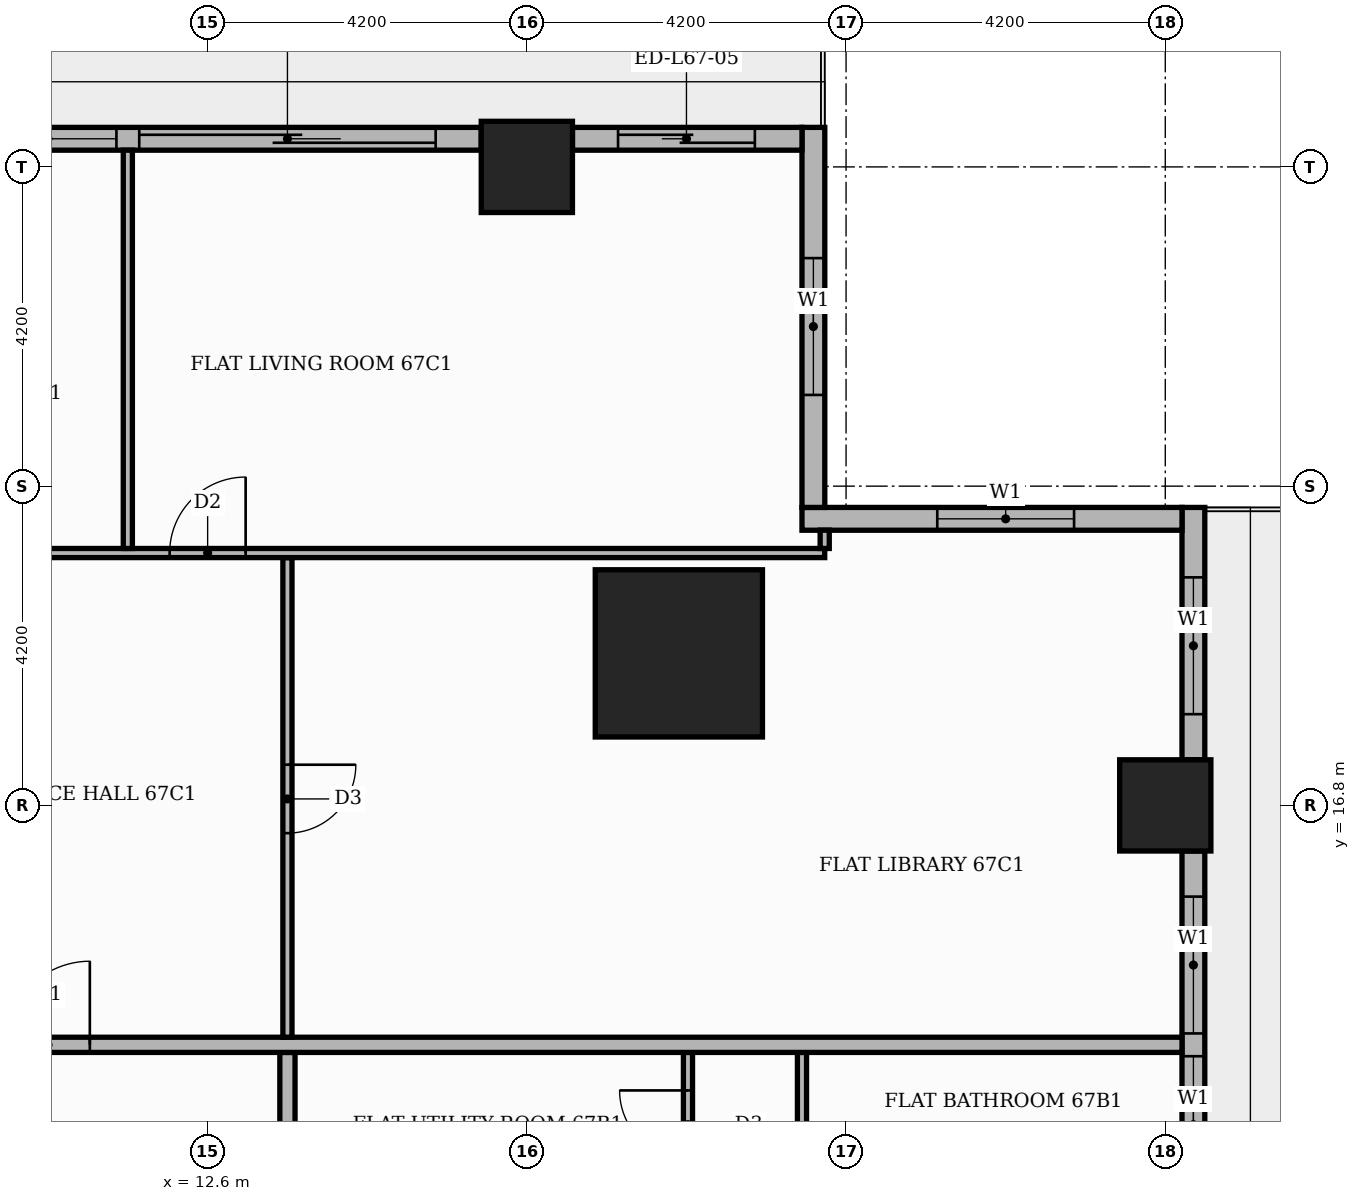
"""IFC4 building model, lengths in metres.
Left out: names, types, materials, properties, quantities, classifications, styles, units other than length and angle.
Written with IfcOpenShell. Run it as: python <this file> out.ifc"""

import sys

from ifc_helpers import new_model, si_unit, direction, frame, frame_2d, origin, origin_2d, place, context, subcontext, project, spatial, rectangle, extrude, element, fill, save


model = new_model("IFC4")
c1 = context("Model", 3, precision=1e-05, world=origin(), true_north=direction((0.0, 1.0)))
c2 = subcontext(c1, "Body", "Model", "MODEL_VIEW")
j1 = project(units=[si_unit("LENGTHUNIT", "METRE"), si_unit("PLANEANGLEUNIT", "RADIAN")], contexts=[c1])
p1 = place(None, origin())
s1 = spatial("IfcSite", under=j1, at=p1, CompositionType="ELEMENT")
p2 = place(p1, origin())
s2 = spatial("IfcBuilding", under=s1, at=p2, CompositionType="ELEMENT")
p3 = place(p2, frame((0.0, 0.0, 279.6)))
s3 = spatial("IfcBuildingStorey", under=s2, at=p3, CompositionType="ELEMENT", Elevation=279.6)
p4 = place(p3, frame((18.8, 18.8, 0.0), z_axis=(0.0, 0.0, 1.0), x_axis=(1.0, 0.0, 0.0)))
e1 = element("IfcColumn", 1, at=p4, inside=s3, PredefinedType="COLUMN", context=c2, shape_type="SweptSolid", body=[
    extrude(rectangle(XDim=2.2, YDim=2.2, at=origin_2d()), origin(), (0.0, 0.0, 1.0), 3.9),
])
for number, where, z_axis, x_axis in (
    (2, (25.2, 16.8, 0.0), (0.0, 0.0, 1.0), (1.0, 0.0, 0.0)),
    (3, (16.8, 25.2, 0.0), (0.0, 0.0, 1.0), (1.0, 0.0, 0.0)),
):
    element("IfcColumn", number, at=place(p3, frame(where, z_axis=z_axis, x_axis=x_axis)), inside=s3, PredefinedType="COLUMN", context=c2, shape_type="SweptSolid", body=[
        extrude(rectangle(XDim=1.2, YDim=1.2, at=origin_2d()), origin(), (0.0, 0.0, 1.0), 3.9),
    ])
p5 = place(p3, frame((25.57, 9.0, 0.0), z_axis=(0.0, 0.0, 1.0), x_axis=(0.0, 1.0, 0.0)))
e4 = element("IfcWall", 4, at=p5, inside=s3, PredefinedType="STANDARD", context=c2, shape_type="SweptSolid", body=[
    extrude(rectangle(XDim=7.2, YDim=0.3, at=frame_2d((3.6, 0.0))), origin(), (0.0, 0.0, 1.0), 3.48),
])
p6 = place(p5, frame((0.6, 0.0, 0.9)))
e5 = element("IfcOpeningElement", 5, at=p6, cuts=e4, PredefinedType="OPENING", context=c2, shape_type="SweptSolid", body=[
    extrude(rectangle(XDim=1.8, YDim=2.1, at=frame_2d((0.9, 1.05))), frame((0.0, 0.16, 0.0), z_axis=(0.0, -1.0, 0.0), x_axis=(1.0, 0.0, 0.0)), (0.0, 0.0, 1.0), 0.32),
])
p7 = place(p5, frame((2.7, 0.0, 0.9)))
e6 = element("IfcOpeningElement", 6, at=p7, cuts=e4, PredefinedType="OPENING", context=c2, shape_type="SweptSolid", body=[
    extrude(rectangle(XDim=1.8, YDim=2.1, at=frame_2d((0.9, 1.05))), frame((0.0, 0.16, 0.0), z_axis=(0.0, -1.0, 0.0), x_axis=(1.0, 0.0, 0.0)), (0.0, 0.0, 1.0), 0.32),
])
p8 = place(p5, frame((4.8, 0.0, 0.9)))
e7 = element("IfcOpeningElement", 7, at=p8, cuts=e4, PredefinedType="OPENING", context=c2, shape_type="SweptSolid", body=[
    extrude(rectangle(XDim=1.8, YDim=2.1, at=frame_2d((0.9, 1.05))), frame((0.0, 0.16, 0.0), z_axis=(0.0, -1.0, 0.0), x_axis=(1.0, 0.0, 0.0)), (0.0, 0.0, 1.0), 0.32),
])
p9 = place(p3, frame((25.57, 17.4, 0.0), z_axis=(0.0, 0.0, 1.0), x_axis=(0.0, 1.0, 0.0)))
e8 = element("IfcWall", 8, at=p9, inside=s3, PredefinedType="STANDARD", context=c2, shape_type="SweptSolid", body=[
    extrude(rectangle(XDim=3.32, YDim=0.3, at=frame_2d((1.66, 0.0))), origin(), (0.0, 0.0, 1.0), 3.48),
])
p10 = place(p9, frame((0.6, 0.0, 0.9)))
e9 = element("IfcOpeningElement", 9, at=p10, cuts=e8, PredefinedType="OPENING", context=c2, shape_type="SweptSolid", body=[
    extrude(rectangle(XDim=1.8, YDim=2.1, at=frame_2d((0.9, 1.05))), frame((0.0, 0.16, 0.0), z_axis=(0.0, -1.0, 0.0), x_axis=(1.0, 0.0, 0.0)), (0.0, 0.0, 1.0), 0.32),
])
p11 = place(p3, frame((25.42, 20.57, 0.0), z_axis=(0.0, 0.0, 1.0), x_axis=(-1.0, 0.0, 0.0)))
e10 = element("IfcWall", 10, at=p11, inside=s3, PredefinedType="STANDARD", context=c2, shape_type="SweptSolid", body=[
    extrude(rectangle(XDim=5.0, YDim=0.3, at=frame_2d((2.5, 0.0))), origin(), (0.0, 0.0, 1.0), 3.48),
])
p12 = place(p11, frame((1.42, 0.0, 0.9)))
e11 = element("IfcOpeningElement", 11, at=p12, cuts=e10, PredefinedType="OPENING", context=c2, shape_type="SweptSolid", body=[
    extrude(rectangle(XDim=1.8, YDim=2.1, at=frame_2d((0.9, 1.05))), frame((0.0, 0.16, 0.0), z_axis=(0.0, -1.0, 0.0), x_axis=(1.0, 0.0, 0.0)), (0.0, 0.0, 1.0), 0.32),
])
p13 = place(p3, frame((20.57, 20.72, 0.0), z_axis=(0.0, 0.0, 1.0), x_axis=(0.0, 1.0, 0.0)))
e12 = element("IfcWall", 12, at=p13, inside=s3, PredefinedType="STANDARD", context=c2, shape_type="SweptSolid", body=[
    extrude(rectangle(XDim=5.0, YDim=0.3, at=frame_2d((2.5, 0.0))), origin(), (0.0, 0.0, 1.0), 3.48),
])
p14 = place(p13, frame((1.48, 0.0, 0.9)))
e13 = element("IfcOpeningElement", 13, at=p14, cuts=e12, PredefinedType="OPENING", context=c2, shape_type="SweptSolid", body=[
    extrude(rectangle(XDim=1.8, YDim=2.1, at=frame_2d((0.9, 1.05))), frame((0.0, 0.16, 0.0), z_axis=(0.0, -1.0, 0.0), x_axis=(1.0, 0.0, 0.0)), (0.0, 0.0, 1.0), 0.32),
])
p15 = place(p3, frame((20.42, 25.57, 0.0), z_axis=(0.0, 0.0, 1.0), x_axis=(-1.0, 0.0, 0.0)))
e14 = element("IfcWall", 14, at=p15, inside=s3, PredefinedType="STANDARD", context=c2, shape_type="SweptSolid", body=[
    extrude(rectangle(XDim=3.02, YDim=0.3, at=frame_2d((1.51, 0.0))), origin(), (0.0, 0.0, 1.0), 3.48),
])
p16 = place(p15, frame((0.62, 0.0, 0.0)))
e15 = element("IfcOpeningElement", 15, at=p16, cuts=e14, PredefinedType="OPENING", context=c2, shape_type="SweptSolid", body=[
    extrude(rectangle(XDim=1.8, YDim=2.4, at=frame_2d((0.9, 1.2))), frame((0.0, 0.16, 0.0), z_axis=(0.0, -1.0, 0.0), x_axis=(1.0, 0.0, 0.0)), (0.0, 0.0, 1.0), 0.32),
])
p17 = place(p3, frame((16.2, 25.57, 0.0), z_axis=(0.0, 0.0, 1.0), x_axis=(-1.0, 0.0, 0.0)))
e16 = element("IfcWall", 16, at=p17, inside=s3, PredefinedType="STANDARD", context=c2, shape_type="SweptSolid", body=[
    extrude(rectangle(XDim=7.2, YDim=0.3, at=frame_2d((3.6, 0.0))), origin(), (0.0, 0.0, 1.0), 3.48),
])
p18 = place(p17, frame((0.6, 0.0, 0.0)))
e17 = element("IfcOpeningElement", 17, at=p18, cuts=e16, PredefinedType="OPENING", context=c2, shape_type="SweptSolid", body=[
    extrude(rectangle(XDim=3.9, YDim=2.4, at=frame_2d((1.95, 1.2))), frame((0.0, 0.16, 0.0), z_axis=(0.0, -1.0, 0.0), x_axis=(1.0, 0.0, 0.0)), (0.0, 0.0, 1.0), 0.32),
])
p19 = place(p17, frame((4.8, 0.0, 0.9)))
e18 = element("IfcOpeningElement", 18, at=p19, cuts=e16, PredefinedType="OPENING", context=c2, shape_type="SweptSolid", body=[
    extrude(rectangle(XDim=1.8, YDim=2.1, at=frame_2d((0.9, 1.05))), frame((0.0, 0.16, 0.0), z_axis=(0.0, -1.0, 0.0), x_axis=(1.0, 0.0, 0.0)), (0.0, 0.0, 1.0), 0.32),
])
p20 = place(p3, frame((13.65, 11.1, 0.0), z_axis=(0.0, 0.0, 1.0), x_axis=(0.0, 1.0, 0.0)))
e19 = element("IfcWall", 19, at=p20, inside=s3, PredefinedType="PARTITIONING", context=c2, shape_type="SweptSolid", body=[
    extrude(rectangle(XDim=2.45, YDim=0.2, at=frame_2d((1.225, 0.0))), origin(), (0.0, 0.0, 1.0), 3.48),
])
p21 = place(p3, frame((18.92, 11.61, 0.0), z_axis=(0.0, 0.0, 1.0), x_axis=(0.0, 1.0, 0.0)))
e20 = element("IfcWall", 20, at=p21, inside=s3, PredefinedType="PARTITIONING", context=c2, shape_type="SweptSolid", body=[
    extrude(rectangle(XDim=1.94, YDim=0.12, at=frame_2d((0.97, 0.0))), origin(), (0.0, 0.0, 1.0), 3.48),
])
p22 = place(p21, frame((0.54, 0.0, 0.0)))
e21 = element("IfcOpeningElement", 21, at=p22, cuts=e20, PredefinedType="OPENING", context=c2, shape_type="SweptSolid", body=[
    extrude(rectangle(XDim=0.9, YDim=2.1, at=frame_2d((0.45, 1.05))), frame((0.0, 0.07, 0.0), z_axis=(0.0, -1.0, 0.0), x_axis=(1.0, 0.0, 0.0)), (0.0, 0.0, 1.0), 0.14),
])
p23 = place(p3, frame((20.42, 11.61, 0.0), z_axis=(0.0, 0.0, 1.0), x_axis=(0.0, 1.0, 0.0)))
e22 = element("IfcWall", 22, at=p23, inside=s3, PredefinedType="PARTITIONING", context=c2, shape_type="SweptSolid", body=[
    extrude(rectangle(XDim=1.94, YDim=0.12, at=frame_2d((0.97, 0.0))), origin(), (0.0, 0.0, 1.0), 3.48),
])
p24 = place(p3, frame((-13.65, 13.65, 0.0), z_axis=(0.0, 0.0, 1.0), x_axis=(1.0, 0.0, 0.0)))
e23 = element("IfcWall", 23, at=p24, inside=s3, PredefinedType="PARTITIONING", context=c2, shape_type="SweptSolid", body=[
    extrude(rectangle(XDim=39.07, YDim=0.2, at=frame_2d((19.535, 0.0))), origin(), (0.0, 0.0, 1.0), 3.48),
])
p25 = place(p24, frame((23.6, 0.0, 0.0)))
e24 = element("IfcOpeningElement", 24, at=p25, cuts=e23, PredefinedType="OPENING", context=c2, shape_type="SweptSolid", body=[
    extrude(rectangle(XDim=1.1, YDim=2.4, at=frame_2d((0.55, 1.2))), frame((0.0, 0.11, 0.0), z_axis=(0.0, -1.0, 0.0), x_axis=(1.0, 0.0, 0.0)), (0.0, 0.0, 1.0), 0.22),
])
p26 = place(p3, frame((13.65, 13.75, 0.0), z_axis=(0.0, 0.0, 1.0), x_axis=(0.0, 1.0, 0.0)))
e25 = element("IfcWall", 25, at=p26, inside=s3, PredefinedType="PARTITIONING", context=c2, shape_type="SweptSolid", body=[
    extrude(rectangle(XDim=6.31, YDim=0.12, at=frame_2d((3.155, 0.0))), origin(), (0.0, 0.0, 1.0), 3.48),
])
p27 = place(p26, frame((2.685, 0.0, 0.0)))
e26 = element("IfcOpeningElement", 26, at=p27, cuts=e25, PredefinedType="OPENING", context=c2, shape_type="SweptSolid", body=[
    extrude(rectangle(XDim=0.9, YDim=2.1, at=frame_2d((0.45, 1.05))), frame((0.0, 0.07, 0.0), z_axis=(0.0, -1.0, 0.0), x_axis=(1.0, 0.0, 0.0)), (0.0, 0.0, 1.0), 0.14),
])
p28 = place(p3, frame((-13.55, 20.12, 0.0), z_axis=(0.0, 0.0, 1.0), x_axis=(1.0, 0.0, 0.0)))
e27 = element("IfcWall", 27, at=p28, inside=s3, PredefinedType="PARTITIONING", context=c2, shape_type="SweptSolid", body=[
    extrude(rectangle(XDim=34.269, YDim=0.12, at=frame_2d((17.135, 0.0))), origin(), (0.0, 0.0, 1.0), 3.48),
])
p29 = place(p28, frame((25.65, 0.0, 0.0)))
e28 = element("IfcOpeningElement", 28, at=p29, cuts=e27, PredefinedType="OPENING", context=c2, shape_type="SweptSolid", body=[
    extrude(rectangle(XDim=1.0, YDim=2.1, at=frame_2d((0.5, 1.05))), frame((0.0, 0.07, 0.0), z_axis=(0.0, -1.0, 0.0), x_axis=(1.0, 0.0, 0.0)), (0.0, 0.0, 1.0), 0.14),
])
p30 = place(p28, frame((22.55, 0.0, 0.0)))
e29 = element("IfcOpeningElement", 29, at=p30, cuts=e27, PredefinedType="OPENING", context=c2, shape_type="SweptSolid", body=[
    extrude(rectangle(XDim=0.9, YDim=2.1, at=frame_2d((0.45, 1.05))), frame((0.0, 0.07, 0.0), z_axis=(0.0, -1.0, 0.0), x_axis=(1.0, 0.0, 0.0)), (0.0, 0.0, 1.0), 0.14),
])
p31 = place(p28, frame((18.35, 0.0, 0.0)))
e30 = element("IfcOpeningElement", 30, at=p31, cuts=e27, PredefinedType="OPENING", context=c2, shape_type="SweptSolid", body=[
    extrude(rectangle(XDim=0.9, YDim=2.1, at=frame_2d((0.45, 1.05))), frame((0.0, 0.07, 0.0), z_axis=(0.0, -1.0, 0.0), x_axis=(1.0, 0.0, 0.0)), (0.0, 0.0, 1.0), 0.14),
])
p32 = place(p28, frame((9.95, 0.0, 0.0)))
e31 = element("IfcOpeningElement", 31, at=p32, cuts=e27, PredefinedType="OPENING", context=c2, shape_type="SweptSolid", body=[
    extrude(rectangle(XDim=0.9, YDim=2.1, at=frame_2d((0.45, 1.05))), frame((0.0, 0.07, 0.0), z_axis=(0.0, -1.0, 0.0), x_axis=(1.0, 0.0, 0.0)), (0.0, 0.0, 1.0), 0.14),
])
p33 = place(p28, frame((3.65, 0.0, 0.0)))
e32 = element("IfcOpeningElement", 32, at=p33, cuts=e27, PredefinedType="OPENING", context=c2, shape_type="SweptSolid", body=[
    extrude(rectangle(XDim=0.9, YDim=2.1, at=frame_2d((0.45, 1.05))), frame((0.0, 0.07, 0.0), z_axis=(0.0, -1.0, 0.0), x_axis=(1.0, 0.0, 0.0)), (0.0, 0.0, 1.0), 0.14),
])
p34 = place(p3, frame((11.55, 20.18, 0.0), z_axis=(0.0, 0.0, 1.0), x_axis=(0.0, 1.0, 0.0)))
e33 = element("IfcWall", 33, at=p34, inside=s3, PredefinedType="PARTITIONING", context=c2, shape_type="SweptSolid", body=[
    extrude(rectangle(XDim=5.24, YDim=0.12, at=frame_2d((2.62, 0.0))), origin(), (0.0, 0.0, 1.0), 3.48),
])
p35 = place(p3, frame((20.719, 20.18, 0.0), z_axis=(0.0, 0.0, 1.0), x_axis=(0.0, 1.0, 0.0)))
e34 = element("IfcWall", 34, at=p35, inside=s3, PredefinedType="PARTITIONING", context=c2, shape_type="SweptSolid", body=[
    extrude(rectangle(XDim=0.241, YDim=0.12, at=frame_2d((0.121, 0.0))), origin(), (0.0, 0.0, 1.0), 3.48),
])
p36 = place(p7, origin())
e35 = element("IfcWindow", 35, at=p36, inside=s3, PartitioningType="SINGLE_PANEL", PredefinedType="WINDOW", context=c2, shape_type="SweptSolid", body=[
    extrude(rectangle(XDim=1.8, YDim=2.1, at=frame_2d((0.9, 1.05))), frame((0.0, 0.03, 0.0), z_axis=(0.0, -1.0, 0.0), x_axis=(1.0, 0.0, 0.0)), (0.0, 0.0, 1.0), 0.06),
])
fill(e6, e35)
p37 = place(p8, origin())
e36 = element("IfcWindow", 36, at=p37, inside=s3, PartitioningType="SINGLE_PANEL", PredefinedType="WINDOW", context=c2, shape_type="SweptSolid", body=[
    extrude(rectangle(XDim=1.8, YDim=2.1, at=frame_2d((0.9, 1.05))), frame((0.0, 0.03, 0.0), z_axis=(0.0, -1.0, 0.0), x_axis=(1.0, 0.0, 0.0)), (0.0, 0.0, 1.0), 0.06),
])
fill(e7, e36)
p38 = place(p10, origin())
e37 = element("IfcWindow", 37, at=p38, inside=s3, PartitioningType="SINGLE_PANEL", PredefinedType="WINDOW", context=c2, shape_type="SweptSolid", body=[
    extrude(rectangle(XDim=1.8, YDim=2.1, at=frame_2d((0.9, 1.05))), frame((0.0, 0.03, 0.0), z_axis=(0.0, -1.0, 0.0), x_axis=(1.0, 0.0, 0.0)), (0.0, 0.0, 1.0), 0.06),
])
fill(e9, e37)
p39 = place(p12, origin())
e38 = element("IfcWindow", 38, at=p39, inside=s3, PartitioningType="SINGLE_PANEL", PredefinedType="WINDOW", context=c2, shape_type="SweptSolid", body=[
    extrude(rectangle(XDim=1.8, YDim=2.1, at=frame_2d((0.9, 1.05))), frame((0.0, 0.03, 0.0), z_axis=(0.0, -1.0, 0.0), x_axis=(1.0, 0.0, 0.0)), (0.0, 0.0, 1.0), 0.06),
])
fill(e11, e38)
p40 = place(p14, origin())
e39 = element("IfcWindow", 39, at=p40, inside=s3, PartitioningType="SINGLE_PANEL", PredefinedType="WINDOW", context=c2, shape_type="SweptSolid", body=[
    extrude(rectangle(XDim=1.8, YDim=2.1, at=frame_2d((0.9, 1.05))), frame((0.0, 0.03, 0.0), z_axis=(0.0, -1.0, 0.0), x_axis=(1.0, 0.0, 0.0)), (0.0, 0.0, 1.0), 0.06),
])
fill(e13, e39)
p41 = place(p16, origin())
e40 = element("IfcDoor", 40, at=p41, inside=s3, OperationType="SLIDING_TO_RIGHT", PredefinedType="DOOR", context=c2, shape_type="SweptSolid", body=[
    extrude(rectangle(XDim=1.8, YDim=2.4, at=frame_2d((0.9, 1.2))), frame((0.0, 0.025, 0.0), z_axis=(0.0, -1.0, 0.0), x_axis=(1.0, 0.0, 0.0)), (0.0, 0.0, 1.0), 0.05),
])
fill(e15, e40)
p42 = place(p18, origin())
e41 = element("IfcDoor", 41, at=p42, inside=s3, OperationType="SLIDING_TO_LEFT", PredefinedType="DOOR", context=c2, shape_type="SweptSolid", body=[
    extrude(rectangle(XDim=3.9, YDim=2.4, at=frame_2d((1.95, 1.2))), frame((0.0, 0.025, 0.0), z_axis=(0.0, -1.0, 0.0), x_axis=(1.0, 0.0, 0.0)), (0.0, 0.0, 1.0), 0.05),
])
fill(e17, e41)
p43 = place(p19, origin())
e42 = element("IfcWindow", 42, at=p43, inside=s3, PartitioningType="SINGLE_PANEL", PredefinedType="WINDOW", context=c2, shape_type="SweptSolid", body=[
    extrude(rectangle(XDim=1.8, YDim=2.1, at=frame_2d((0.9, 1.05))), frame((0.0, 0.03, 0.0), z_axis=(0.0, -1.0, 0.0), x_axis=(1.0, 0.0, 0.0)), (0.0, 0.0, 1.0), 0.06),
])
fill(e18, e42)
p44 = place(p22, origin())
e43 = element("IfcDoor", 43, at=p44, inside=s3, OperationType="SINGLE_SWING_RIGHT", PredefinedType="DOOR", context=c2, shape_type="SweptSolid", body=[
    extrude(rectangle(XDim=0.9, YDim=2.1, at=frame_2d((0.45, 1.05))), frame((0.0, 0.025, 0.0), z_axis=(0.0, -1.0, 0.0), x_axis=(1.0, 0.0, 0.0)), (0.0, 0.0, 1.0), 0.05),
])
fill(e21, e43)
p45 = place(p25, origin())
e44 = element("IfcDoor", 44, at=p45, inside=s3, OperationType="SINGLE_SWING_RIGHT", PredefinedType="DOOR", context=c2, shape_type="SweptSolid", body=[
    extrude(rectangle(XDim=1.1, YDim=2.4, at=frame_2d((0.55, 1.2))), frame((0.0, 0.025, 0.0), z_axis=(0.0, -1.0, 0.0), x_axis=(1.0, 0.0, 0.0)), (0.0, 0.0, 1.0), 0.05),
])
fill(e24, e44)
p46 = place(p27, frame((0.9, 0.0, 0.0), z_axis=(0.0, 0.0, 1.0), x_axis=(-1.0, 0.0, 0.0)))
e45 = element("IfcDoor", 45, at=p46, inside=s3, OperationType="SINGLE_SWING_RIGHT", PredefinedType="DOOR", context=c2, shape_type="SweptSolid", body=[
    extrude(rectangle(XDim=0.9, YDim=2.1, at=frame_2d((0.45, 1.05))), frame((0.0, 0.025, 0.0), z_axis=(0.0, -1.0, 0.0), x_axis=(1.0, 0.0, 0.0)), (0.0, 0.0, 1.0), 0.05),
])
fill(e26, e45)
p47 = place(p29, origin())
e46 = element("IfcDoor", 46, at=p47, inside=s3, OperationType="SINGLE_SWING_RIGHT", PredefinedType="DOOR", context=c2, shape_type="SweptSolid", body=[
    extrude(rectangle(XDim=1.0, YDim=2.1, at=frame_2d((0.5, 1.05))), frame((0.0, 0.025, 0.0), z_axis=(0.0, -1.0, 0.0), x_axis=(1.0, 0.0, 0.0)), (0.0, 0.0, 1.0), 0.05),
])
fill(e28, e46)
save(model, sys.argv[1])
